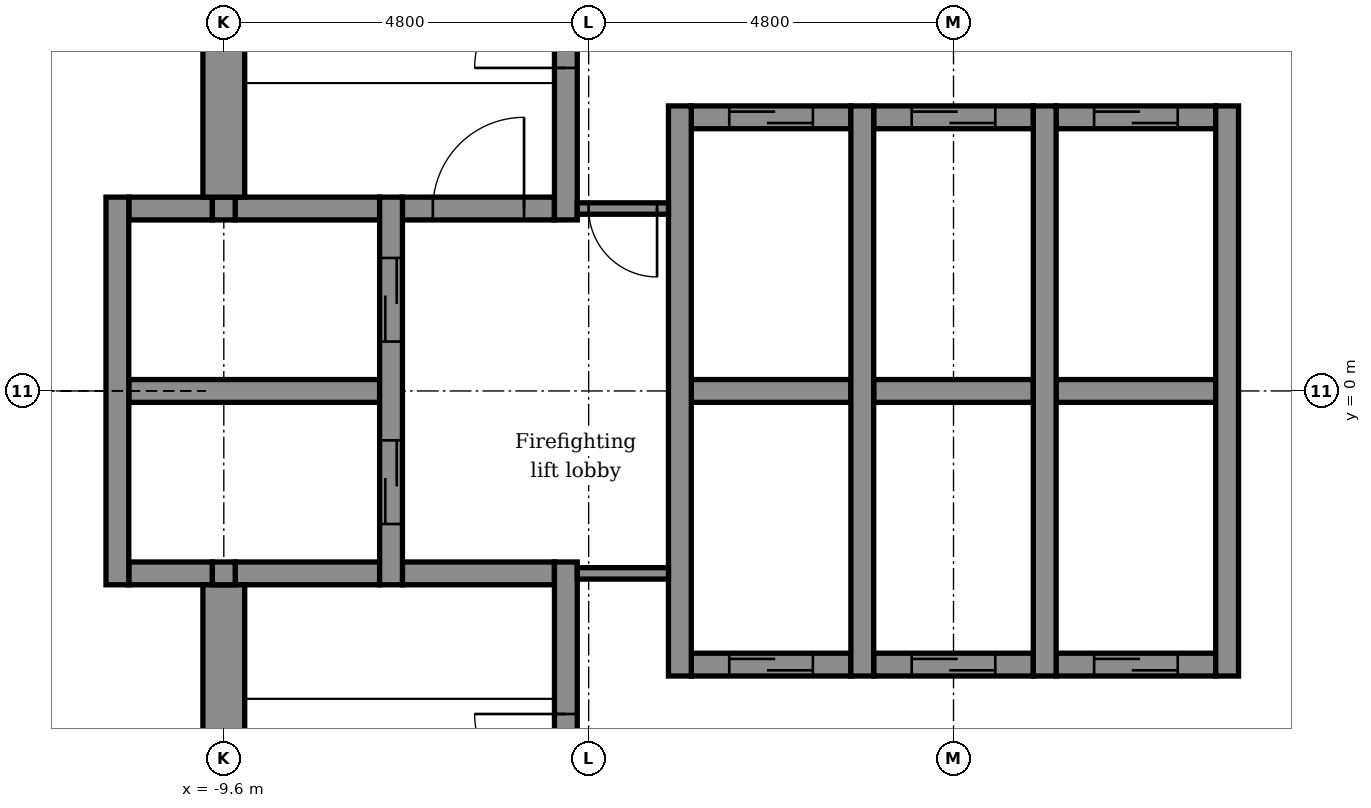
"""IFC4 building model, lengths in metres.
Left out: names, types, materials, properties, quantities, classifications, styles, units other than length and angle.
Written with IfcOpenShell. Run it as: python <this file> out.ifc"""

import sys

from ifc_helpers import new_model, si_unit, direction, frame, frame_2d, origin, place, context, subcontext, project, spatial, rectangle, extrude, element, fill, save


model = new_model("IFC4")
c1 = context("Model", 3, precision=1e-05, world=origin(), true_north=direction((0.0, 1.0)))
c2 = subcontext(c1, "Body", "Model", "MODEL_VIEW")
j1 = project(units=[si_unit("LENGTHUNIT", "METRE"), si_unit("PLANEANGLEUNIT", "RADIAN")], contexts=[c1])
p1 = place(None, origin())
s1 = spatial("IfcSite", under=j1, at=p1, CompositionType="ELEMENT")
p2 = place(p1, origin())
s2 = spatial("IfcBuilding", under=s1, at=p2, CompositionType="ELEMENT")
p3 = place(p2, frame((0.0, 0.0, 242.3)))
s3 = spatial("IfcBuildingStorey", under=s2, at=p3, CompositionType="ELEMENT", Elevation=242.3)
p4 = place(p3, frame((-3.45, -3.6, -0.15), z_axis=(0.0, 0.0, 1.0), x_axis=(1.0, 0.0, 0.0)))
e1 = element("IfcWall", 1, at=p4, inside=s3, PredefinedType="STANDARD", context=c2, shape_type="SweptSolid", body=[
    extrude(rectangle(XDim=2.1, YDim=0.3, at=frame_2d((1.05, 0.0))), origin(), (0.0, 0.0, 1.0), 3.9),
])
p5 = place(p4, frame((0.5, 0.0, 0.15)))
e2 = element("IfcOpeningElement", 2, at=p5, cuts=e1, PredefinedType="OPENING", context=c2, shape_type="SweptSolid", body=[
    extrude(rectangle(XDim=1.1, YDim=2.1, at=frame_2d((0.55, 1.05))), frame((0.0, 0.16, 0.0), z_axis=(0.0, -1.0, 0.0), x_axis=(1.0, 0.0, 0.0)), (0.0, 0.0, 1.0), 0.32),
])
p6 = place(p3, frame((-1.05, -3.6, -0.15), z_axis=(0.0, 0.0, 1.0), x_axis=(1.0, 0.0, 0.0)))
e3 = element("IfcWall", 3, at=p6, inside=s3, PredefinedType="STANDARD", context=c2, shape_type="SweptSolid", body=[
    extrude(rectangle(XDim=2.1, YDim=0.3, at=frame_2d((1.05, 0.0))), origin(), (0.0, 0.0, 1.0), 3.9),
])
p7 = place(p6, frame((0.5, 0.0, 0.15)))
e4 = element("IfcOpeningElement", 4, at=p7, cuts=e3, PredefinedType="OPENING", context=c2, shape_type="SweptSolid", body=[
    extrude(rectangle(XDim=1.1, YDim=2.1, at=frame_2d((0.55, 1.05))), frame((0.0, 0.16, 0.0), z_axis=(0.0, -1.0, 0.0), x_axis=(1.0, 0.0, 0.0)), (0.0, 0.0, 1.0), 0.32),
])
p8 = place(p3, frame((1.35, -3.6, -0.15), z_axis=(0.0, 0.0, 1.0), x_axis=(1.0, 0.0, 0.0)))
e5 = element("IfcWall", 5, at=p8, inside=s3, PredefinedType="STANDARD", context=c2, shape_type="SweptSolid", body=[
    extrude(rectangle(XDim=2.1, YDim=0.3, at=frame_2d((1.05, 0.0))), origin(), (0.0, 0.0, 1.0), 3.9),
])
p9 = place(p8, frame((0.5, 0.0, 0.15)))
e6 = element("IfcOpeningElement", 6, at=p9, cuts=e5, PredefinedType="OPENING", context=c2, shape_type="SweptSolid", body=[
    extrude(rectangle(XDim=1.1, YDim=2.1, at=frame_2d((0.55, 1.05))), frame((0.0, 0.16, 0.0), z_axis=(0.0, -1.0, 0.0), x_axis=(1.0, 0.0, 0.0)), (0.0, 0.0, 1.0), 0.32),
])
p10 = place(p3, frame((-10.85, -2.4, -0.15), z_axis=(0.0, 0.0, 1.0), x_axis=(1.0, 0.0, 0.0)))
e7 = element("IfcWall", 7, at=p10, inside=s3, PredefinedType="STANDARD", context=c2, shape_type="SweptSolid", body=[
    extrude(rectangle(XDim=1.1, YDim=0.3, at=frame_2d((0.55, 0.0))), origin(), (0.0, 0.0, 1.0), 3.9),
])
p11 = place(p3, frame((-9.45, -2.4, -0.15), z_axis=(0.0, 0.0, 1.0), x_axis=(1.0, 0.0, 0.0)))
e8 = element("IfcWall", 8, at=p11, inside=s3, PredefinedType="STANDARD", context=c2, shape_type="SweptSolid", body=[
    extrude(rectangle(XDim=1.9, YDim=0.3, at=frame_2d((0.95, 0.0))), origin(), (0.0, 0.0, 1.0), 3.9),
])
p12 = place(p3, frame((-7.25, -2.4, -0.15), z_axis=(0.0, 0.0, 1.0), x_axis=(1.0, 0.0, 0.0)))
e9 = element("IfcWall", 9, at=p12, inside=s3, PredefinedType="STANDARD", context=c2, shape_type="SweptSolid", body=[
    extrude(rectangle(XDim=2.0, YDim=0.3, at=frame_2d((1.0, 0.0))), origin(), (0.0, 0.0, 1.0), 3.9),
])
p13 = place(p3, frame((-10.85, 0.0, -0.15), z_axis=(0.0, 0.0, 1.0), x_axis=(1.0, 0.0, 0.0)))
e10 = element("IfcWall", 10, at=p13, inside=s3, PredefinedType="STANDARD", context=c2, shape_type="SweptSolid", body=[
    extrude(rectangle(XDim=3.3, YDim=0.3, at=frame_2d((1.65, 0.0))), origin(), (0.0, 0.0, 1.0), 3.9),
])
p14 = place(p3, frame((-3.45, 0.0, -0.15), z_axis=(0.0, 0.0, 1.0), x_axis=(1.0, 0.0, 0.0)))
e11 = element("IfcWall", 11, at=p14, inside=s3, PredefinedType="STANDARD", context=c2, shape_type="SweptSolid", body=[
    extrude(rectangle(XDim=2.1, YDim=0.3, at=frame_2d((1.05, 0.0))), origin(), (0.0, 0.0, 1.0), 3.9),
])
p15 = place(p3, frame((-1.05, 0.0, -0.15), z_axis=(0.0, 0.0, 1.0), x_axis=(1.0, 0.0, 0.0)))
e12 = element("IfcWall", 12, at=p15, inside=s3, PredefinedType="STANDARD", context=c2, shape_type="SweptSolid", body=[
    extrude(rectangle(XDim=2.1, YDim=0.3, at=frame_2d((1.05, 0.0))), origin(), (0.0, 0.0, 1.0), 3.9),
])
p16 = place(p3, frame((1.35, 0.0, -0.15), z_axis=(0.0, 0.0, 1.0), x_axis=(1.0, 0.0, 0.0)))
e13 = element("IfcWall", 13, at=p16, inside=s3, PredefinedType="STANDARD", context=c2, shape_type="SweptSolid", body=[
    extrude(rectangle(XDim=2.1, YDim=0.3, at=frame_2d((1.05, 0.0))), origin(), (0.0, 0.0, 1.0), 3.9),
])
p17 = place(p3, frame((-10.85, 2.4, -0.15), z_axis=(0.0, 0.0, 1.0), x_axis=(1.0, 0.0, 0.0)))
e14 = element("IfcWall", 14, at=p17, inside=s3, PredefinedType="STANDARD", context=c2, shape_type="SweptSolid", body=[
    extrude(rectangle(XDim=1.1, YDim=0.3, at=frame_2d((0.55, 0.0))), origin(), (0.0, 0.0, 1.0), 3.9),
])
p18 = place(p3, frame((-9.45, 2.4, -0.15), z_axis=(0.0, 0.0, 1.0), x_axis=(1.0, 0.0, 0.0)))
e15 = element("IfcWall", 15, at=p18, inside=s3, PredefinedType="STANDARD", context=c2, shape_type="SweptSolid", body=[
    extrude(rectangle(XDim=1.9, YDim=0.3, at=frame_2d((0.95, 0.0))), origin(), (0.0, 0.0, 1.0), 3.9),
])
p19 = place(p3, frame((-7.25, 2.4, -0.15), z_axis=(0.0, 0.0, 1.0), x_axis=(1.0, 0.0, 0.0)))
e16 = element("IfcWall", 16, at=p19, inside=s3, PredefinedType="STANDARD", context=c2, shape_type="SweptSolid", body=[
    extrude(rectangle(XDim=2.0, YDim=0.3, at=frame_2d((1.0, 0.0))), origin(), (0.0, 0.0, 1.0), 3.9),
])
p20 = place(p19, frame((0.4, 0.0, 0.15)))
e17 = element("IfcOpeningElement", 17, at=p20, cuts=e16, PredefinedType="OPENING", context=c2, shape_type="SweptSolid", body=[
    extrude(rectangle(XDim=1.2, YDim=2.1, at=frame_2d((0.6, 1.05))), frame((0.0, 0.16, 0.0), z_axis=(0.0, -1.0, 0.0), x_axis=(1.0, 0.0, 0.0)), (0.0, 0.0, 1.0), 0.32),
])
p21 = place(p3, frame((-3.45, 3.6, -0.15), z_axis=(0.0, 0.0, 1.0), x_axis=(1.0, 0.0, 0.0)))
e18 = element("IfcWall", 18, at=p21, inside=s3, PredefinedType="STANDARD", context=c2, shape_type="SweptSolid", body=[
    extrude(rectangle(XDim=2.1, YDim=0.3, at=frame_2d((1.05, 0.0))), origin(), (0.0, 0.0, 1.0), 3.9),
])
p22 = place(p21, frame((0.5, 0.0, 0.15)))
e19 = element("IfcOpeningElement", 19, at=p22, cuts=e18, PredefinedType="OPENING", context=c2, shape_type="SweptSolid", body=[
    extrude(rectangle(XDim=1.1, YDim=2.1, at=frame_2d((0.55, 1.05))), frame((0.0, 0.16, 0.0), z_axis=(0.0, -1.0, 0.0), x_axis=(1.0, 0.0, 0.0)), (0.0, 0.0, 1.0), 0.32),
])
p23 = place(p3, frame((-1.05, 3.6, -0.15), z_axis=(0.0, 0.0, 1.0), x_axis=(1.0, 0.0, 0.0)))
e20 = element("IfcWall", 20, at=p23, inside=s3, PredefinedType="STANDARD", context=c2, shape_type="SweptSolid", body=[
    extrude(rectangle(XDim=2.1, YDim=0.3, at=frame_2d((1.05, 0.0))), origin(), (0.0, 0.0, 1.0), 3.9),
])
p24 = place(p23, frame((0.5, 0.0, 0.15)))
e21 = element("IfcOpeningElement", 21, at=p24, cuts=e20, PredefinedType="OPENING", context=c2, shape_type="SweptSolid", body=[
    extrude(rectangle(XDim=1.1, YDim=2.1, at=frame_2d((0.55, 1.05))), frame((0.0, 0.16, 0.0), z_axis=(0.0, -1.0, 0.0), x_axis=(1.0, 0.0, 0.0)), (0.0, 0.0, 1.0), 0.32),
])
p25 = place(p3, frame((1.35, 3.6, -0.15), z_axis=(0.0, 0.0, 1.0), x_axis=(1.0, 0.0, 0.0)))
e22 = element("IfcWall", 22, at=p25, inside=s3, PredefinedType="STANDARD", context=c2, shape_type="SweptSolid", body=[
    extrude(rectangle(XDim=2.1, YDim=0.3, at=frame_2d((1.05, 0.0))), origin(), (0.0, 0.0, 1.0), 3.9),
])
p26 = place(p25, frame((0.5, 0.0, 0.15)))
e23 = element("IfcOpeningElement", 23, at=p26, cuts=e22, PredefinedType="OPENING", context=c2, shape_type="SweptSolid", body=[
    extrude(rectangle(XDim=1.1, YDim=2.1, at=frame_2d((0.55, 1.05))), frame((0.0, 0.16, 0.0), z_axis=(0.0, -1.0, 0.0), x_axis=(1.0, 0.0, 0.0)), (0.0, 0.0, 1.0), 0.32),
])
p27 = place(p3, frame((-11.0, -2.55, -0.15), z_axis=(0.0, 0.0, 1.0), x_axis=(0.0, 1.0, 0.0)))
e24 = element("IfcWall", 24, at=p27, inside=s3, PredefinedType="STANDARD", context=c2, shape_type="SweptSolid", body=[
    extrude(rectangle(XDim=5.1, YDim=0.3, at=frame_2d((2.55, 0.0))), origin(), (0.0, 0.0, 1.0), 3.9),
])
p28 = place(p3, frame((-9.6, -10.15, -0.15), z_axis=(0.0, 0.0, 1.0), x_axis=(0.0, 1.0, 0.0)))
e25 = element("IfcWall", 25, at=p28, inside=s3, PredefinedType="SHEAR", context=c2, shape_type="SweptSolid", body=[
    extrude(rectangle(XDim=7.6, YDim=0.55, at=frame_2d((3.8, 0.0))), origin(), (0.0, 0.0, 1.0), 3.9),
])
for number, where, z_axis, x_axis in (
    (26, (-9.6, -2.55, -0.15), (0.0, 0.0, 1.0), (0.0, 1.0, 0.0)),
    (27, (-9.6, 2.25, -0.15), (0.0, 0.0, 1.0), (0.0, 1.0, 0.0)),
):
    element("IfcWall", number, at=place(p3, frame(where, z_axis=z_axis, x_axis=x_axis)), inside=s3, PredefinedType="STANDARD", context=c2, shape_type="SweptSolid", body=[
        extrude(rectangle(XDim=0.3, YDim=0.3, at=frame_2d((0.15, 0.0))), origin(), (0.0, 0.0, 1.0), 3.9),
    ])
p29 = place(p3, frame((-9.6, 2.55, -0.15), z_axis=(0.0, 0.0, 1.0), x_axis=(0.0, 1.0, 0.0)))
e28 = element("IfcWall", 28, at=p29, inside=s3, PredefinedType="SHEAR", context=c2, shape_type="SweptSolid", body=[
    extrude(rectangle(XDim=7.6, YDim=0.55, at=frame_2d((3.8, 0.0))), origin(), (0.0, 0.0, 1.0), 3.9),
])
p30 = place(p3, frame((-7.4, -2.55, -0.15), z_axis=(0.0, 0.0, 1.0), x_axis=(0.0, 1.0, 0.0)))
e29 = element("IfcWall", 29, at=p30, inside=s3, PredefinedType="STANDARD", context=c2, shape_type="SweptSolid", body=[
    extrude(rectangle(XDim=5.1, YDim=0.3, at=frame_2d((2.55, 0.0))), origin(), (0.0, 0.0, 1.0), 3.9),
])
p31 = place(p30, frame((0.8, 0.0, 0.15)))
e30 = element("IfcOpeningElement", 30, at=p31, cuts=e29, PredefinedType="OPENING", context=c2, shape_type="SweptSolid", body=[
    extrude(rectangle(XDim=1.1, YDim=2.1, at=frame_2d((0.55, 1.05))), frame((0.0, 0.16, 0.0), z_axis=(0.0, -1.0, 0.0), x_axis=(1.0, 0.0, 0.0)), (0.0, 0.0, 1.0), 0.32),
])
p32 = place(p30, frame((3.2, 0.0, 0.15)))
e31 = element("IfcOpeningElement", 31, at=p32, cuts=e29, PredefinedType="OPENING", context=c2, shape_type="SweptSolid", body=[
    extrude(rectangle(XDim=1.1, YDim=2.1, at=frame_2d((0.55, 1.05))), frame((0.0, 0.16, 0.0), z_axis=(0.0, -1.0, 0.0), x_axis=(1.0, 0.0, 0.0)), (0.0, 0.0, 1.0), 0.32),
])
p33 = place(p3, frame((-5.1, -9.325, -0.15), z_axis=(0.0, 0.0, 1.0), x_axis=(0.0, 1.0, 0.0)))
e32 = element("IfcWall", 32, at=p33, inside=s3, PredefinedType="STANDARD", context=c2, shape_type="SweptSolid", body=[
    extrude(rectangle(XDim=7.075, YDim=0.3, at=frame_2d((3.538, 0.0))), origin(), (0.0, 0.0, 1.0), 3.9),
])
p34 = place(p33, frame((3.875, 0.0, 0.15)))
e33 = element("IfcOpeningElement", 33, at=p34, cuts=e32, PredefinedType="OPENING", context=c2, shape_type="SweptSolid", body=[
    extrude(rectangle(XDim=1.2, YDim=2.1, at=frame_2d((0.6, 1.05))), frame((0.0, 0.16, 0.0), z_axis=(0.0, -1.0, 0.0), x_axis=(1.0, 0.0, 0.0)), (0.0, 0.0, 1.0), 0.32),
])
p35 = place(p3, frame((-5.1, 2.25, -0.15), z_axis=(0.0, 0.0, 1.0), x_axis=(0.0, 1.0, 0.0)))
e34 = element("IfcWall", 34, at=p35, inside=s3, PredefinedType="STANDARD", context=c2, shape_type="SweptSolid", body=[
    extrude(rectangle(XDim=7.075, YDim=0.3, at=frame_2d((3.538, 0.0))), origin(), (0.0, 0.0, 1.0), 3.9),
])
p36 = place(p35, frame((2.0, 0.0, 0.15)))
e35 = element("IfcOpeningElement", 35, at=p36, cuts=e34, PredefinedType="OPENING", context=c2, shape_type="SweptSolid", body=[
    extrude(rectangle(XDim=1.2, YDim=2.1, at=frame_2d((0.6, 1.05))), frame((0.0, 0.16, 0.0), z_axis=(0.0, -1.0, 0.0), x_axis=(1.0, 0.0, 0.0)), (0.0, 0.0, 1.0), 0.32),
])
for number, where, z_axis, x_axis in (
    (36, (-3.6, -3.75, -0.15), (0.0, 0.0, 1.0), (0.0, 1.0, 0.0)),
    (37, (-1.2, -3.75, -0.15), (0.0, 0.0, 1.0), (0.0, 1.0, 0.0)),
    (38, (1.2, -3.75, -0.15), (0.0, 0.0, 1.0), (0.0, 1.0, 0.0)),
    (39, (3.6, -3.75, -0.15), (0.0, 0.0, 1.0), (0.0, 1.0, 0.0)),
):
    element("IfcWall", number, at=place(p3, frame(where, z_axis=z_axis, x_axis=x_axis)), inside=s3, PredefinedType="STANDARD", context=c2, shape_type="SweptSolid", body=[
        extrude(rectangle(XDim=7.5, YDim=0.3, at=frame_2d((3.75, 0.0))), origin(), (0.0, 0.0, 1.0), 3.9),
    ])
p37 = place(p3, frame((-4.95, 2.4, 0.0), z_axis=(0.0, 0.0, 1.0), x_axis=(1.0, 0.0, 0.0)))
e40 = element("IfcWall", 40, at=p37, inside=s3, PredefinedType="PARTITIONING", context=c2, shape_type="SweptSolid", body=[
    extrude(rectangle(XDim=1.2, YDim=0.15, at=frame_2d((0.6, 0.0))), origin(), (0.0, 0.0, 1.0), 3.75),
])
p38 = place(p37, frame((0.15, 0.0, 0.0)))
e41 = element("IfcOpeningElement", 41, at=p38, cuts=e40, PredefinedType="OPENING", context=c2, shape_type="SweptSolid", body=[
    extrude(rectangle(XDim=0.9, YDim=2.1, at=frame_2d((0.45, 1.05))), frame((0.0, 0.085, 0.0), z_axis=(0.0, -1.0, 0.0), x_axis=(1.0, 0.0, 0.0)), (0.0, 0.0, 1.0), 0.17),
])
p39 = place(p3, frame((-4.95, -2.4, 0.0), z_axis=(0.0, 0.0, 1.0), x_axis=(1.0, 0.0, 0.0)))
e42 = element("IfcWall", 42, at=p39, inside=s3, PredefinedType="PARTITIONING", context=c2, shape_type="SweptSolid", body=[
    extrude(rectangle(XDim=1.2, YDim=0.15, at=frame_2d((0.6, 0.0))), origin(), (0.0, 0.0, 1.0), 3.75),
])
p40 = place(p31, origin())
e43 = element("IfcDoor", 43, at=p40, inside=s3, OperationType="DOUBLE_DOOR_SLIDING", PredefinedType="DOOR", context=c2, shape_type="SweptSolid", body=[
    extrude(rectangle(XDim=1.1, YDim=2.1, at=frame_2d((0.55, 1.05))), frame((0.0, 0.025, 0.0), z_axis=(0.0, -1.0, 0.0), x_axis=(1.0, 0.0, 0.0)), (0.0, 0.0, 1.0), 0.05),
])
fill(e30, e43)
p41 = place(p32, origin())
e44 = element("IfcDoor", 44, at=p41, inside=s3, OperationType="DOUBLE_DOOR_SLIDING", PredefinedType="DOOR", context=c2, shape_type="SweptSolid", body=[
    extrude(rectangle(XDim=1.1, YDim=2.1, at=frame_2d((0.55, 1.05))), frame((0.0, 0.025, 0.0), z_axis=(0.0, -1.0, 0.0), x_axis=(1.0, 0.0, 0.0)), (0.0, 0.0, 1.0), 0.05),
])
fill(e31, e44)
p42 = place(p22, origin())
e45 = element("IfcDoor", 45, at=p42, inside=s3, OperationType="DOUBLE_DOOR_SLIDING", PredefinedType="DOOR", context=c2, shape_type="SweptSolid", body=[
    extrude(rectangle(XDim=1.1, YDim=2.1, at=frame_2d((0.55, 1.05))), frame((0.0, 0.025, 0.0), z_axis=(0.0, -1.0, 0.0), x_axis=(1.0, 0.0, 0.0)), (0.0, 0.0, 1.0), 0.05),
])
fill(e19, e45)
p43 = place(p24, origin())
e46 = element("IfcDoor", 46, at=p43, inside=s3, OperationType="DOUBLE_DOOR_SLIDING", PredefinedType="DOOR", context=c2, shape_type="SweptSolid", body=[
    extrude(rectangle(XDim=1.1, YDim=2.1, at=frame_2d((0.55, 1.05))), frame((0.0, 0.025, 0.0), z_axis=(0.0, -1.0, 0.0), x_axis=(1.0, 0.0, 0.0)), (0.0, 0.0, 1.0), 0.05),
])
fill(e21, e46)
p44 = place(p26, origin())
e47 = element("IfcDoor", 47, at=p44, inside=s3, OperationType="DOUBLE_DOOR_SLIDING", PredefinedType="DOOR", context=c2, shape_type="SweptSolid", body=[
    extrude(rectangle(XDim=1.1, YDim=2.1, at=frame_2d((0.55, 1.05))), frame((0.0, 0.025, 0.0), z_axis=(0.0, -1.0, 0.0), x_axis=(1.0, 0.0, 0.0)), (0.0, 0.0, 1.0), 0.05),
])
fill(e23, e47)
p45 = place(p5, origin())
e48 = element("IfcDoor", 48, at=p45, inside=s3, OperationType="DOUBLE_DOOR_SLIDING", PredefinedType="DOOR", context=c2, shape_type="SweptSolid", body=[
    extrude(rectangle(XDim=1.1, YDim=2.1, at=frame_2d((0.55, 1.05))), frame((0.0, 0.025, 0.0), z_axis=(0.0, -1.0, 0.0), x_axis=(1.0, 0.0, 0.0)), (0.0, 0.0, 1.0), 0.05),
])
fill(e2, e48)
p46 = place(p7, origin())
e49 = element("IfcDoor", 49, at=p46, inside=s3, OperationType="DOUBLE_DOOR_SLIDING", PredefinedType="DOOR", context=c2, shape_type="SweptSolid", body=[
    extrude(rectangle(XDim=1.1, YDim=2.1, at=frame_2d((0.55, 1.05))), frame((0.0, 0.025, 0.0), z_axis=(0.0, -1.0, 0.0), x_axis=(1.0, 0.0, 0.0)), (0.0, 0.0, 1.0), 0.05),
])
fill(e4, e49)
p47 = place(p9, origin())
e50 = element("IfcDoor", 50, at=p47, inside=s3, OperationType="DOUBLE_DOOR_SLIDING", PredefinedType="DOOR", context=c2, shape_type="SweptSolid", body=[
    extrude(rectangle(XDim=1.1, YDim=2.1, at=frame_2d((0.55, 1.05))), frame((0.0, 0.025, 0.0), z_axis=(0.0, -1.0, 0.0), x_axis=(1.0, 0.0, 0.0)), (0.0, 0.0, 1.0), 0.05),
])
fill(e6, e50)
p48 = place(p36, origin())
e51 = element("IfcDoor", 51, at=p48, inside=s3, OperationType="SINGLE_SWING_LEFT", PredefinedType="DOOR", context=c2, shape_type="SweptSolid", body=[
    extrude(rectangle(XDim=1.2, YDim=2.1, at=frame_2d((0.6, 1.05))), frame((0.0, 0.025, 0.0), z_axis=(0.0, -1.0, 0.0), x_axis=(1.0, 0.0, 0.0)), (0.0, 0.0, 1.0), 0.05),
])
fill(e35, e51)
p49 = place(p34, origin())
e52 = element("IfcDoor", 52, at=p49, inside=s3, OperationType="SINGLE_SWING_RIGHT", PredefinedType="DOOR", context=c2, shape_type="SweptSolid", body=[
    extrude(rectangle(XDim=1.2, YDim=2.1, at=frame_2d((0.6, 1.05))), frame((0.0, 0.025, 0.0), z_axis=(0.0, -1.0, 0.0), x_axis=(1.0, 0.0, 0.0)), (0.0, 0.0, 1.0), 0.05),
])
fill(e33, e52)
p50 = place(p38, frame((0.9, 0.0, 0.0), z_axis=(0.0, 0.0, 1.0), x_axis=(-1.0, 0.0, 0.0)))
e53 = element("IfcDoor", 53, at=p50, inside=s3, OperationType="SINGLE_SWING_RIGHT", PredefinedType="DOOR", context=c2, shape_type="SweptSolid", body=[
    extrude(rectangle(XDim=0.9, YDim=2.1, at=frame_2d((0.45, 1.05))), frame((0.0, 0.025, 0.0), z_axis=(0.0, -1.0, 0.0), x_axis=(1.0, 0.0, 0.0)), (0.0, 0.0, 1.0), 0.05),
])
fill(e41, e53)
p51 = place(p20, origin())
e54 = element("IfcDoor", 54, at=p51, inside=s3, OperationType="SINGLE_SWING_RIGHT", PredefinedType="DOOR", context=c2, shape_type="SweptSolid", body=[
    extrude(rectangle(XDim=1.2, YDim=2.1, at=frame_2d((0.6, 1.05))), frame((0.0, 0.025, 0.0), z_axis=(0.0, -1.0, 0.0), x_axis=(1.0, 0.0, 0.0)), (0.0, 0.0, 1.0), 0.05),
])
fill(e17, e54)
save(model, sys.argv[1])
